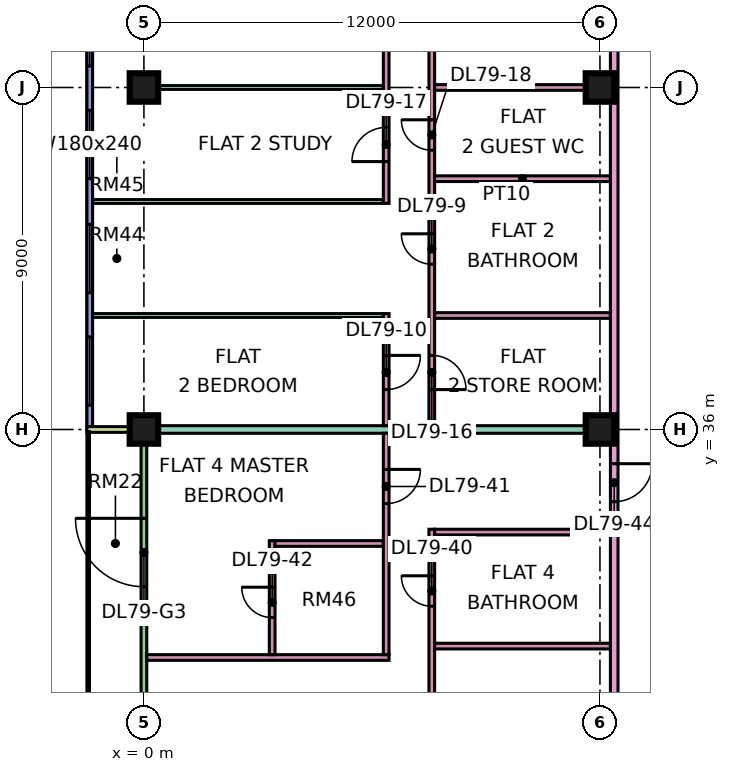
"""IFC4 building model, lengths in metres.
Left out: names, types, materials, properties, quantities, classifications, styles, units other than length and angle.
Written with IfcOpenShell. Run it as: python <this file> out.ifc"""

import sys

from ifc_helpers import new_model, si_unit, direction, frame, frame_2d, origin, origin_2d, place, context, subcontext, project, spatial, rectangle, extrude, element, fill, save


model = new_model("IFC4")
c1 = context("Model", 3, precision=1e-05, world=origin(), true_north=direction((0.0, 1.0)))
c2 = subcontext(c1, "Body", "Model", "MODEL_VIEW")
j1 = project(units=[si_unit("LENGTHUNIT", "METRE"), si_unit("PLANEANGLEUNIT", "RADIAN")], contexts=[c1])
p1 = place(None, origin())
s1 = spatial("IfcSite", under=j1, at=p1, CompositionType="ELEMENT")
p2 = place(p1, origin())
s2 = spatial("IfcBuilding", under=s1, at=p2, CompositionType="ELEMENT")
p3 = place(p2, frame((0.0, 0.0, 342.65)))
s3 = spatial("IfcBuildingStorey", under=s2, at=p3, CompositionType="ELEMENT", Elevation=342.65)
p4 = place(p3, frame((0.0, 36.0, 0.0), z_axis=(0.0, 0.0, 1.0), x_axis=(1.0, 0.0, 0.0)))
e1 = element("IfcColumn", 1, at=p4, inside=s3, PredefinedType="COLUMN", context=c2, shape_type="SweptSolid", body=[
    extrude(rectangle(XDim=0.75, YDim=0.75, at=origin_2d()), origin(), (0.0, 0.0, 1.0), 3.75),
])
p5 = place(p3, frame((0.0, 45.0, 0.0), z_axis=(0.0, 0.0, 1.0), x_axis=(1.0, 0.0, 0.0)))
e2 = element("IfcColumn", 2, at=p5, inside=s3, PredefinedType="COLUMN", context=c2, shape_type="SweptSolid", body=[
    extrude(rectangle(XDim=0.75, YDim=0.75, at=origin_2d()), origin(), (0.0, 0.0, 1.0), 3.75),
])
for number, where, z_axis, x_axis in (
    (3, (12.0, 36.0, 0.0), (0.0, 0.0, 1.0), (1.0, 0.0, 0.0)),
    (4, (12.0, 45.0, 0.0), (0.0, 0.0, 1.0), (1.0, 0.0, 0.0)),
):
    element("IfcColumn", number, at=place(p3, frame(where, z_axis=z_axis, x_axis=x_axis)), inside=s3, PredefinedType="COLUMN", context=c2, shape_type="SweptSolid", body=[
        extrude(rectangle(XDim=0.75, YDim=0.75, at=origin_2d()), origin(), (0.0, 0.0, 1.0), 3.75),
    ])
p6 = place(p3, frame((-1.425, 47.925, 0.0), z_axis=(0.0, 0.0, 1.0), x_axis=(0.0, -1.0, 0.0)))
e5 = element("IfcWall", 5, at=p6, inside=s3, PredefinedType="SOLIDWALL", context=c2, shape_type="SweptSolid", body=[
    extrude(rectangle(XDim=11.85, YDim=0.15, at=frame_2d((5.925, 0.0))), origin(), (0.0, 0.0, 1.0), 3.35),
])
p7 = place(p6, frame((0.562, 0.0, 0.45)))
e6 = element("IfcOpeningElement", 6, at=p7, cuts=e5, PredefinedType="OPENING", context=c2, shape_type="SweptSolid", body=[
    extrude(rectangle(XDim=1.8, YDim=2.4, at=frame_2d((0.9, 1.2))), frame((0.0, 0.085, 0.0), z_axis=(0.0, -1.0, 0.0), x_axis=(1.0, 0.0, 0.0)), (0.0, 0.0, 1.0), 0.17),
])
p8 = place(p6, frame((3.525, 0.0, 0.45)))
e7 = element("IfcOpeningElement", 7, at=p8, cuts=e5, PredefinedType="OPENING", context=c2, shape_type="SweptSolid", body=[
    extrude(rectangle(XDim=1.8, YDim=2.4, at=frame_2d((0.9, 1.2))), frame((0.0, 0.085, 0.0), z_axis=(0.0, -1.0, 0.0), x_axis=(1.0, 0.0, 0.0)), (0.0, 0.0, 1.0), 0.17),
])
p9 = place(p6, frame((6.525, 0.0, 0.45)))
e8 = element("IfcOpeningElement", 8, at=p9, cuts=e5, PredefinedType="OPENING", context=c2, shape_type="SweptSolid", body=[
    extrude(rectangle(XDim=1.8, YDim=2.4, at=frame_2d((0.9, 1.2))), frame((0.0, 0.085, 0.0), z_axis=(0.0, -1.0, 0.0), x_axis=(1.0, 0.0, 0.0)), (0.0, 0.0, 1.0), 0.17),
])
p10 = place(p6, frame((9.488, 0.0, 0.45)))
e9 = element("IfcOpeningElement", 9, at=p10, cuts=e5, PredefinedType="OPENING", context=c2, shape_type="SweptSolid", body=[
    extrude(rectangle(XDim=1.8, YDim=2.4, at=frame_2d((0.9, 1.2))), frame((0.0, 0.085, 0.0), z_axis=(0.0, -1.0, 0.0), x_axis=(1.0, 0.0, 0.0)), (0.0, 0.0, 1.0), 0.17),
])
p11 = place(p3, frame((0.0, 35.925, 0.0), z_axis=(0.0, 0.0, 1.0), x_axis=(0.0, -1.0, 0.0)))
e10 = element("IfcWall", 10, at=p11, inside=s3, PredefinedType="SOLIDWALL", context=c2, shape_type="SweptSolid", body=[
    extrude(rectangle(XDim=11.85, YDim=0.15, at=frame_2d((5.925, 0.0))), origin(), (0.0, 0.0, 1.0), 3.35),
])
p12 = place(p11, frame((2.262, 0.0, 0.0)))
e11 = element("IfcOpeningElement", 11, at=p12, cuts=e10, PredefinedType="OPENING", context=c2, shape_type="SweptSolid", body=[
    extrude(rectangle(XDim=1.8, YDim=2.4, at=frame_2d((0.9, 1.2))), frame((0.0, 0.085, 0.0), z_axis=(0.0, -1.0, 0.0), x_axis=(1.0, 0.0, 0.0)), (0.0, 0.0, 1.0), 0.17),
])
p13 = place(p11, frame((7.188, 0.0, 0.45)))
e12 = element("IfcOpeningElement", 12, at=p13, cuts=e10, PredefinedType="OPENING", context=c2, shape_type="SweptSolid", body=[
    extrude(rectangle(XDim=3.0, YDim=2.4, at=frame_2d((1.5, 1.2))), frame((0.0, 0.085, 0.0), z_axis=(0.0, -1.0, 0.0), x_axis=(1.0, 0.0, 0.0)), (0.0, 0.0, 1.0), 0.17),
])
p14 = place(p3, frame((-1.5, 36.0, 0.0), z_axis=(0.0, 0.0, 1.0), x_axis=(1.0, 0.0, 0.0)))
e13 = element("IfcWall", 13, at=p14, inside=s3, PredefinedType="SOLIDWALL", context=c2, shape_type="SweptSolid", body=[
    extrude(rectangle(XDim=1.5, YDim=0.15, at=frame_2d((0.75, 0.0))), origin(), (0.0, 0.0, 1.0), 3.35),
])
e14 = element("IfcWall", 14, at=p4, inside=s3, PredefinedType="PARTITIONING", context=c2, shape_type="SweptSolid", body=[
    extrude(rectangle(XDim=12.275, YDim=0.2, at=frame_2d((6.137, 0.0))), origin(), (0.0, 0.0, 1.0), 3.35),
])
for number, where, z_axis, x_axis in (
    (15, (-1.35, 39.0, 0.0), (0.0, 0.0, 1.0), (1.0, 0.0, 0.0)),
    (16, (-1.35, 42.0, 0.0), (0.0, 0.0, 1.0), (1.0, 0.0, 0.0)),
):
    element("IfcWall", number, at=place(p3, frame(where, z_axis=z_axis, x_axis=x_axis)), inside=s3, PredefinedType="PARTITIONING", context=c2, shape_type="SweptSolid", body=[
        extrude(rectangle(XDim=7.65, YDim=0.1, at=frame_2d((3.825, 0.0))), origin(), (0.0, 0.0, 1.0), 3.35),
    ])
e17 = element("IfcWall", 17, at=p5, inside=s3, PredefinedType="PARTITIONING", context=c2, shape_type="SweptSolid", body=[
    extrude(rectangle(XDim=6.3, YDim=0.1, at=frame_2d((3.15, 0.0))), origin(), (0.0, 0.0, 1.0), 3.35),
])
p15 = place(p3, frame((0.074, 30.0, 0.0), z_axis=(0.0, 0.0, 1.0), x_axis=(1.0, 0.0, 0.0)))
e18 = element("IfcWall", 18, at=p15, inside=s3, PredefinedType="PARTITIONING", context=c2, shape_type="SweptSolid", body=[
    extrude(rectangle(XDim=6.376, YDim=0.15, at=frame_2d((3.188, 0.0))), origin(), (0.0, 0.0, 1.0), 3.35),
])
p16 = place(p3, frame((3.375, 30.075, 0.0), z_axis=(0.0, 0.0, 1.0), x_axis=(0.0, 1.0, 0.0)))
e19 = element("IfcWall", 19, at=p16, inside=s3, PredefinedType="PARTITIONING", context=c2, shape_type="SweptSolid", body=[
    extrude(rectangle(XDim=3.0, YDim=0.15, at=frame_2d((1.5, 0.0))), origin(), (0.0, 0.0, 1.0), 3.35),
])
p17 = place(p16, frame((0.975, 0.0, 0.0)))
e20 = element("IfcOpeningElement", 20, at=p17, cuts=e19, PredefinedType="OPENING", context=c2, shape_type="SweptSolid", body=[
    extrude(rectangle(XDim=0.8, YDim=2.1, at=frame_2d((0.4, 1.05))), frame((0.0, 0.085, 0.0), z_axis=(0.0, -1.0, 0.0), x_axis=(1.0, 0.0, 0.0)), (0.0, 0.0, 1.0), 0.17),
])
p18 = place(p3, frame((3.45, 33.0, 0.0), z_axis=(0.0, 0.0, 1.0), x_axis=(1.0, 0.0, 0.0)))
e21 = element("IfcWall", 21, at=p18, inside=s3, PredefinedType="PARTITIONING", context=c2, shape_type="SweptSolid", body=[
    extrude(rectangle(XDim=2.85, YDim=0.15, at=frame_2d((1.425, 0.0))), origin(), (0.0, 0.0, 1.0), 3.35),
])
p19 = place(p3, frame((6.375, 30.075, 0.0), z_axis=(0.0, 0.0, 1.0), x_axis=(0.0, 1.0, 0.0)))
e22 = element("IfcWall", 22, at=p19, inside=s3, PredefinedType="PARTITIONING", context=c2, shape_type="SweptSolid", body=[
    extrude(rectangle(XDim=5.825, YDim=0.15, at=frame_2d((2.913, 0.0))), origin(), (0.0, 0.0, 1.0), 3.35),
])
p20 = place(p19, frame((3.975, 0.0, 0.0)))
e23 = element("IfcOpeningElement", 23, at=p20, cuts=e22, PredefinedType="OPENING", context=c2, shape_type="SweptSolid", body=[
    extrude(rectangle(XDim=0.9, YDim=2.1, at=frame_2d((0.45, 1.05))), frame((0.0, 0.085, 0.0), z_axis=(0.0, -1.0, 0.0), x_axis=(1.0, 0.0, 0.0)), (0.0, 0.0, 1.0), 0.17),
])
p21 = place(p3, frame((6.375, 36.1, 0.0), z_axis=(0.0, 0.0, 1.0), x_axis=(0.0, 1.0, 0.0)))
e24 = element("IfcWall", 24, at=p21, inside=s3, PredefinedType="PARTITIONING", context=c2, shape_type="SweptSolid", body=[
    extrude(rectangle(XDim=2.95, YDim=0.15, at=frame_2d((1.475, 0.0))), origin(), (0.0, 0.0, 1.0), 3.35),
])
p22 = place(p21, frame((0.95, 0.0, 0.0)))
e25 = element("IfcOpeningElement", 25, at=p22, cuts=e24, PredefinedType="OPENING", context=c2, shape_type="SweptSolid", body=[
    extrude(rectangle(XDim=0.9, YDim=2.1, at=frame_2d((0.45, 1.05))), frame((0.0, 0.085, 0.0), z_axis=(0.0, -1.0, 0.0), x_axis=(1.0, 0.0, 0.0)), (0.0, 0.0, 1.0), 0.17),
])
p23 = place(p3, frame((6.375, 41.95, 0.0), z_axis=(0.0, 0.0, 1.0), x_axis=(0.0, 1.0, 0.0)))
e26 = element("IfcWall", 26, at=p23, inside=s3, PredefinedType="PARTITIONING", context=c2, shape_type="SweptSolid", body=[
    extrude(rectangle(XDim=11.976, YDim=0.15, at=frame_2d((5.988, 0.0))), origin(), (0.0, 0.0, 1.0), 3.35),
])
p24 = place(p23, frame((4.1, 0.0, 0.0)))
e27 = element("IfcOpeningElement", 27, at=p24, cuts=e26, PredefinedType="OPENING", context=c2, shape_type="SweptSolid", body=[
    extrude(rectangle(XDim=0.9, YDim=2.1, at=frame_2d((0.45, 1.05))), frame((0.0, 0.085, 0.0), z_axis=(0.0, -1.0, 0.0), x_axis=(1.0, 0.0, 0.0)), (0.0, 0.0, 1.0), 0.17),
])
p25 = place(p23, frame((10.1, 0.0, 0.0)))
e28 = element("IfcOpeningElement", 28, at=p25, cuts=e26, PredefinedType="OPENING", context=c2, shape_type="SweptSolid", body=[
    extrude(rectangle(XDim=0.9, YDim=2.1, at=frame_2d((0.45, 1.05))), frame((0.0, 0.085, 0.0), z_axis=(0.0, -1.0, 0.0), x_axis=(1.0, 0.0, 0.0)), (0.0, 0.0, 1.0), 0.17),
])
p26 = place(p23, frame((1.1, 0.0, 0.0)))
e29 = element("IfcOpeningElement", 29, at=p26, cuts=e26, PredefinedType="OPENING", context=c2, shape_type="SweptSolid", body=[
    extrude(rectangle(XDim=0.9, YDim=2.1, at=frame_2d((0.45, 1.05))), frame((0.0, 0.085, 0.0), z_axis=(0.0, -1.0, 0.0), x_axis=(1.0, 0.0, 0.0)), (0.0, 0.0, 1.0), 0.17),
])
p27 = place(p3, frame((7.575, 22.5, 0.0), z_axis=(0.0, 0.0, 1.0), x_axis=(0.0, 1.0, 0.0)))
e30 = element("IfcWall", 30, at=p27, inside=s3, PredefinedType="PARTITIONING", context=c2, shape_type="SweptSolid", body=[
    extrude(rectangle(XDim=10.875, YDim=0.15, at=frame_2d((5.438, 0.0))), origin(), (0.0, 0.0, 1.0), 3.35),
])
p28 = place(p27, frame((8.85, 0.0, 0.0)))
e31 = element("IfcOpeningElement", 31, at=p28, cuts=e30, PredefinedType="OPENING", context=c2, shape_type="SweptSolid", body=[
    extrude(rectangle(XDim=0.8, YDim=2.1, at=frame_2d((0.4, 1.05))), frame((0.0, 0.085, 0.0), z_axis=(0.0, -1.0, 0.0), x_axis=(1.0, 0.0, 0.0)), (0.0, 0.0, 1.0), 0.17),
])
p29 = place(p27, frame((3.35, 0.0, 0.0)))
e32 = element("IfcOpeningElement", 32, at=p29, cuts=e30, PredefinedType="OPENING", context=c2, shape_type="SweptSolid", body=[
    extrude(rectangle(XDim=0.9, YDim=2.1, at=frame_2d((0.45, 1.05))), frame((0.0, 0.085, 0.0), z_axis=(0.0, -1.0, 0.0), x_axis=(1.0, 0.0, 0.0)), (0.0, 0.0, 1.0), 0.17),
])
p30 = place(p3, frame((7.575, 36.1, 0.0), z_axis=(0.0, 0.0, 1.0), x_axis=(0.0, 1.0, 0.0)))
e33 = element("IfcWall", 33, at=p30, inside=s3, PredefinedType="PARTITIONING", context=c2, shape_type="SweptSolid", body=[
    extrude(rectangle(XDim=14.65, YDim=0.15, at=frame_2d((7.325, 0.0))), origin(), (0.0, 0.0, 1.0), 3.35),
])
p31 = place(p30, frame((4.25, 0.0, 0.0)))
e34 = element("IfcOpeningElement", 34, at=p31, cuts=e33, PredefinedType="OPENING", context=c2, shape_type="SweptSolid", body=[
    extrude(rectangle(XDim=0.8, YDim=2.1, at=frame_2d((0.4, 1.05))), frame((0.0, 0.085, 0.0), z_axis=(0.0, -1.0, 0.0), x_axis=(1.0, 0.0, 0.0)), (0.0, 0.0, 1.0), 0.17),
])
p32 = place(p30, frame((0.95, 0.0, 0.0)))
e35 = element("IfcOpeningElement", 35, at=p32, cuts=e33, PredefinedType="OPENING", context=c2, shape_type="SweptSolid", body=[
    extrude(rectangle(XDim=0.9, YDim=2.1, at=frame_2d((0.45, 1.05))), frame((0.0, 0.085, 0.0), z_axis=(0.0, -1.0, 0.0), x_axis=(1.0, 0.0, 0.0)), (0.0, 0.0, 1.0), 0.17),
])
p33 = place(p30, frame((7.25, 0.0, 0.0)))
e36 = element("IfcOpeningElement", 36, at=p33, cuts=e33, PredefinedType="OPENING", context=c2, shape_type="SweptSolid", body=[
    extrude(rectangle(XDim=0.8, YDim=2.1, at=frame_2d((0.4, 1.05))), frame((0.0, 0.085, 0.0), z_axis=(0.0, -1.0, 0.0), x_axis=(1.0, 0.0, 0.0)), (0.0, 0.0, 1.0), 0.17),
])
for number, where, z_axis, x_axis in (
    (37, (7.65, 30.3, 0.0), (0.0, 0.0, 1.0), (1.0, 0.0, 0.0)),
    (38, (7.65, 33.3, 0.0), (0.0, 0.0, 1.0), (1.0, 0.0, 0.0)),
    (39, (7.65, 39.0, 0.0), (0.0, 0.0, 1.0), (1.0, 0.0, 0.0)),
    (40, (7.65, 42.6, 0.0), (0.0, 0.0, 1.0), (1.0, 0.0, 0.0)),
    (41, (7.65, 45.0, 0.0), (0.0, 0.0, 1.0), (1.0, 0.0, 0.0)),
):
    element("IfcWall", number, at=place(p3, frame(where, z_axis=z_axis, x_axis=x_axis)), inside=s3, PredefinedType="PARTITIONING", context=c2, shape_type="SweptSolid", body=[
        extrude(rectangle(XDim=4.625, YDim=0.15, at=frame_2d((2.312, 0.0))), origin(), (0.0, 0.0, 1.0), 3.35),
    ])
p34 = place(p3, frame((12.375, 20.0, 0.0), z_axis=(0.0, 0.0, 1.0), x_axis=(0.0, 1.0, 0.0)))
e42 = element("IfcWall", 42, at=p34, inside=s3, PredefinedType="PARTITIONING", context=c2, shape_type="SweptSolid", body=[
    extrude(rectangle(XDim=34.0, YDim=0.2, at=frame_2d((17.0, 0.0))), origin(), (0.0, 0.0, 1.0), 3.35),
])
p35 = place(p34, frame((31.8, 0.0, 0.0)))
e43 = element("IfcOpeningElement", 43, at=p35, cuts=e42, PredefinedType="OPENING", context=c2, shape_type="SweptSolid", body=[
    extrude(rectangle(XDim=1.0, YDim=2.1, at=frame_2d((0.5, 1.05))), frame((0.0, 0.11, 0.0), z_axis=(0.0, -1.0, 0.0), x_axis=(1.0, 0.0, 0.0)), (0.0, 0.0, 1.0), 0.22),
])
p36 = place(p34, frame((0.6, 0.0, 0.0)))
e44 = element("IfcOpeningElement", 44, at=p36, cuts=e42, PredefinedType="OPENING", context=c2, shape_type="SweptSolid", body=[
    extrude(rectangle(XDim=1.2, YDim=2.1, at=frame_2d((0.6, 1.05))), frame((0.0, 0.11, 0.0), z_axis=(0.0, -1.0, 0.0), x_axis=(1.0, 0.0, 0.0)), (0.0, 0.0, 1.0), 0.22),
])
p37 = place(p34, frame((14.1, 0.0, 0.0)))
e45 = element("IfcOpeningElement", 45, at=p37, cuts=e42, PredefinedType="OPENING", context=c2, shape_type="SweptSolid", body=[
    extrude(rectangle(XDim=1.0, YDim=2.1, at=frame_2d((0.5, 1.05))), frame((0.0, 0.11, 0.0), z_axis=(0.0, -1.0, 0.0), x_axis=(1.0, 0.0, 0.0)), (0.0, 0.0, 1.0), 0.22),
])
p38 = place(p7, origin())
e46 = element("IfcWindow", 46, at=p38, inside=s3, PartitioningType="SINGLE_PANEL", PredefinedType="WINDOW", context=c2, shape_type="SweptSolid", body=[
    extrude(rectangle(XDim=1.8, YDim=2.4, at=frame_2d((0.9, 1.2))), frame((0.0, 0.03, 0.0), z_axis=(0.0, -1.0, 0.0), x_axis=(1.0, 0.0, 0.0)), (0.0, 0.0, 1.0), 0.06),
])
fill(e6, e46)
p39 = place(p8, origin())
e47 = element("IfcWindow", 47, at=p39, inside=s3, PartitioningType="SINGLE_PANEL", PredefinedType="WINDOW", context=c2, shape_type="SweptSolid", body=[
    extrude(rectangle(XDim=1.8, YDim=2.4, at=frame_2d((0.9, 1.2))), frame((0.0, 0.03, 0.0), z_axis=(0.0, -1.0, 0.0), x_axis=(1.0, 0.0, 0.0)), (0.0, 0.0, 1.0), 0.06),
])
fill(e7, e47)
p40 = place(p9, origin())
e48 = element("IfcWindow", 48, at=p40, inside=s3, PartitioningType="SINGLE_PANEL", PredefinedType="WINDOW", context=c2, shape_type="SweptSolid", body=[
    extrude(rectangle(XDim=1.8, YDim=2.4, at=frame_2d((0.9, 1.2))), frame((0.0, 0.03, 0.0), z_axis=(0.0, -1.0, 0.0), x_axis=(1.0, 0.0, 0.0)), (0.0, 0.0, 1.0), 0.06),
])
fill(e8, e48)
p41 = place(p10, origin())
e49 = element("IfcWindow", 49, at=p41, inside=s3, PartitioningType="SINGLE_PANEL", PredefinedType="WINDOW", context=c2, shape_type="SweptSolid", body=[
    extrude(rectangle(XDim=1.8, YDim=2.4, at=frame_2d((0.9, 1.2))), frame((0.0, 0.03, 0.0), z_axis=(0.0, -1.0, 0.0), x_axis=(1.0, 0.0, 0.0)), (0.0, 0.0, 1.0), 0.06),
])
fill(e9, e49)
p42 = place(p12, frame((1.8, 0.0, 0.0), z_axis=(0.0, 0.0, 1.0), x_axis=(-1.0, 0.0, 0.0)))
e50 = element("IfcDoor", 50, at=p42, inside=s3, OperationType="DOUBLE_DOOR_SINGLE_SWING", PredefinedType="DOOR", context=c2, shape_type="SweptSolid", body=[
    extrude(rectangle(XDim=1.8, YDim=2.4, at=frame_2d((0.9, 1.2))), frame((0.0, 0.025, 0.0), z_axis=(0.0, -1.0, 0.0), x_axis=(1.0, 0.0, 0.0)), (0.0, 0.0, 1.0), 0.05),
])
fill(e11, e50)
p43 = place(p31, frame((0.8, 0.0, 0.0), z_axis=(0.0, 0.0, 1.0), x_axis=(-1.0, 0.0, 0.0)))
e51 = element("IfcDoor", 51, at=p43, inside=s3, OperationType="SINGLE_SWING_RIGHT", PredefinedType="DOOR", context=c2, shape_type="SweptSolid", body=[
    extrude(rectangle(XDim=0.8, YDim=2.1, at=frame_2d((0.4, 1.05))), frame((0.0, 0.025, 0.0), z_axis=(0.0, -1.0, 0.0), x_axis=(1.0, 0.0, 0.0)), (0.0, 0.0, 1.0), 0.05),
])
fill(e34, e51)
p44 = place(p22, origin())
e52 = element("IfcDoor", 52, at=p44, inside=s3, OperationType="SINGLE_SWING_RIGHT", PredefinedType="DOOR", context=c2, shape_type="SweptSolid", body=[
    extrude(rectangle(XDim=0.9, YDim=2.1, at=frame_2d((0.45, 1.05))), frame((0.0, 0.025, 0.0), z_axis=(0.0, -1.0, 0.0), x_axis=(1.0, 0.0, 0.0)), (0.0, 0.0, 1.0), 0.05),
])
fill(e25, e52)
p45 = place(p32, frame((0.9, 0.0, 0.0), z_axis=(0.0, 0.0, 1.0), x_axis=(-1.0, 0.0, 0.0)))
e53 = element("IfcDoor", 53, at=p45, inside=s3, OperationType="SINGLE_SWING_LEFT", PredefinedType="DOOR", context=c2, shape_type="SweptSolid", body=[
    extrude(rectangle(XDim=0.9, YDim=2.1, at=frame_2d((0.45, 1.05))), frame((0.0, 0.025, 0.0), z_axis=(0.0, -1.0, 0.0), x_axis=(1.0, 0.0, 0.0)), (0.0, 0.0, 1.0), 0.05),
])
fill(e35, e53)
p46 = place(p26, origin())
e54 = element("IfcDoor", 54, at=p46, inside=s3, OperationType="SINGLE_SWING_LEFT", PredefinedType="DOOR", context=c2, shape_type="SweptSolid", body=[
    extrude(rectangle(XDim=0.9, YDim=2.1, at=frame_2d((0.45, 1.05))), frame((0.0, 0.025, 0.0), z_axis=(0.0, -1.0, 0.0), x_axis=(1.0, 0.0, 0.0)), (0.0, 0.0, 1.0), 0.05),
])
fill(e29, e54)
p47 = place(p33, frame((0.8, 0.0, 0.0), z_axis=(0.0, 0.0, 1.0), x_axis=(-1.0, 0.0, 0.0)))
e55 = element("IfcDoor", 55, at=p47, inside=s3, OperationType="SINGLE_SWING_RIGHT", PredefinedType="DOOR", context=c2, shape_type="SweptSolid", body=[
    extrude(rectangle(XDim=0.8, YDim=2.1, at=frame_2d((0.4, 1.05))), frame((0.0, 0.025, 0.0), z_axis=(0.0, -1.0, 0.0), x_axis=(1.0, 0.0, 0.0)), (0.0, 0.0, 1.0), 0.05),
])
fill(e36, e55)
p48 = place(p28, frame((0.8, 0.0, 0.0), z_axis=(0.0, 0.0, 1.0), x_axis=(-1.0, 0.0, 0.0)))
e56 = element("IfcDoor", 56, at=p48, inside=s3, OperationType="SINGLE_SWING_RIGHT", PredefinedType="DOOR", context=c2, shape_type="SweptSolid", body=[
    extrude(rectangle(XDim=0.8, YDim=2.1, at=frame_2d((0.4, 1.05))), frame((0.0, 0.025, 0.0), z_axis=(0.0, -1.0, 0.0), x_axis=(1.0, 0.0, 0.0)), (0.0, 0.0, 1.0), 0.05),
])
fill(e31, e56)
p49 = place(p20, origin())
e57 = element("IfcDoor", 57, at=p49, inside=s3, OperationType="SINGLE_SWING_RIGHT", PredefinedType="DOOR", context=c2, shape_type="SweptSolid", body=[
    extrude(rectangle(XDim=0.9, YDim=2.1, at=frame_2d((0.45, 1.05))), frame((0.0, 0.025, 0.0), z_axis=(0.0, -1.0, 0.0), x_axis=(1.0, 0.0, 0.0)), (0.0, 0.0, 1.0), 0.05),
])
fill(e23, e57)
p50 = place(p17, frame((0.8, 0.0, 0.0), z_axis=(0.0, 0.0, 1.0), x_axis=(-1.0, 0.0, 0.0)))
e58 = element("IfcDoor", 58, at=p50, inside=s3, OperationType="SINGLE_SWING_RIGHT", PredefinedType="DOOR", context=c2, shape_type="SweptSolid", body=[
    extrude(rectangle(XDim=0.8, YDim=2.1, at=frame_2d((0.4, 1.05))), frame((0.0, 0.025, 0.0), z_axis=(0.0, -1.0, 0.0), x_axis=(1.0, 0.0, 0.0)), (0.0, 0.0, 1.0), 0.05),
])
fill(e20, e58)
p51 = place(p37, origin())
e59 = element("IfcDoor", 59, at=p51, inside=s3, OperationType="SINGLE_SWING_RIGHT", PredefinedType="DOOR", context=c2, shape_type="SweptSolid", body=[
    extrude(rectangle(XDim=1.0, YDim=2.1, at=frame_2d((0.5, 1.05))), frame((0.0, 0.025, 0.0), z_axis=(0.0, -1.0, 0.0), x_axis=(1.0, 0.0, 0.0)), (0.0, 0.0, 1.0), 0.05),
])
fill(e45, e59)
save(model, sys.argv[1])
